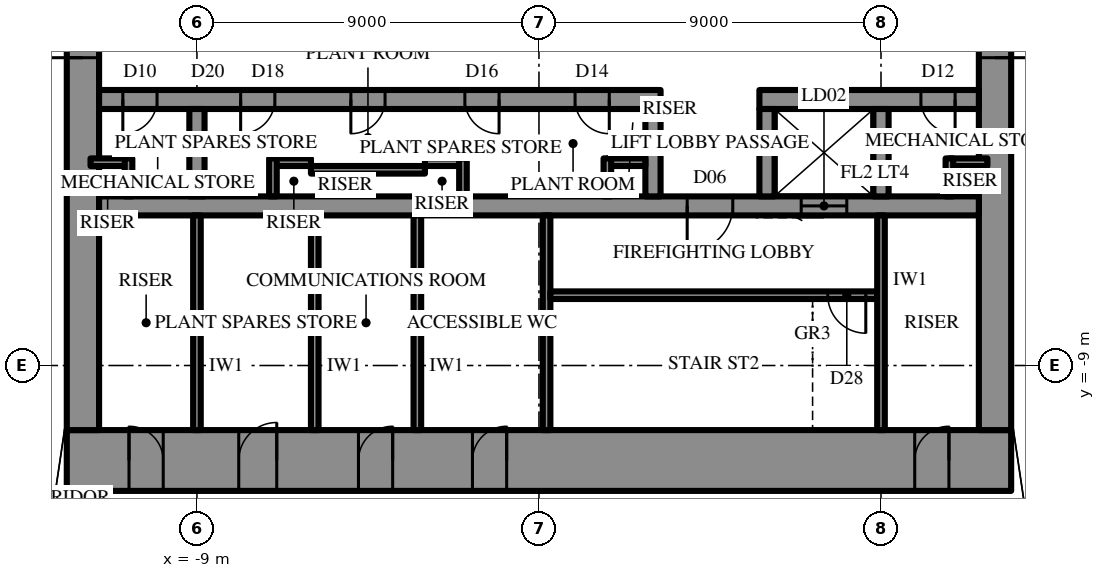
"""IFC4 building model, lengths in metres.
Left out: names, types, materials, properties, quantities, classifications, styles, units other than length and angle.
Written with IfcOpenShell. Run it as: python <this file> out.ifc"""

import sys

from ifc_helpers import new_model, si_unit, direction, frame, frame_2d, origin, place, context, subcontext, project, spatial, rectangle, extrude, element, fill, save


model = new_model("IFC4")
c1 = context("Model", 3, precision=1e-05, world=origin(), true_north=direction((0.0, 1.0)))
c2 = subcontext(c1, "Body", "Model", "MODEL_VIEW")
j1 = project(units=[si_unit("LENGTHUNIT", "METRE"), si_unit("PLANEANGLEUNIT", "RADIAN")], contexts=[c1])
p1 = place(None, origin())
s1 = spatial("IfcSite", under=j1, at=p1, CompositionType="ELEMENT")
p2 = place(p1, origin())
s2 = spatial("IfcBuilding", under=s1, at=p2, CompositionType="ELEMENT")
p3 = place(p2, frame((0.0, 0.0, 402.3)))
s3 = spatial("IfcBuildingStorey", under=s2, at=p3, CompositionType="ELEMENT", Elevation=402.3)
p4 = place(p3, frame((12.425, -11.5, 0.0), z_axis=(0.0, 0.0, 1.0), x_axis=(-1.0, 0.0, 0.0)))
e1 = element("IfcWall", 1, at=p4, inside=s3, PredefinedType="SHEAR", context=c2, shape_type="SweptSolid", body=[
    extrude(rectangle(XDim=24.85, YDim=1.6, at=frame_2d((12.425, 0.0))), origin(), (0.0, 0.0, 1.0), 6.0),
])
p5 = place(p4, frame((13.275, 0.0, 0.0)))
e2 = element("IfcOpeningElement", 2, at=p5, cuts=e1, PredefinedType="OPENING", context=c2, shape_type="SweptSolid", body=[
    extrude(rectangle(XDim=0.9, YDim=2.2, at=frame_2d((0.45, 1.1))), frame((0.0, 0.81, 0.0), z_axis=(0.0, -1.0, 0.0), x_axis=(1.0, 0.0, 0.0)), (0.0, 0.0, 1.0), 1.62),
])
p6 = place(p4, frame((16.275, 0.0, 0.0)))
e3 = element("IfcOpeningElement", 3, at=p6, cuts=e1, PredefinedType="OPENING", context=c2, shape_type="SweptSolid", body=[
    extrude(rectangle(XDim=0.9, YDim=2.2, at=frame_2d((0.45, 1.1))), frame((0.0, 0.81, 0.0), z_axis=(0.0, -1.0, 0.0), x_axis=(1.0, 0.0, 0.0)), (0.0, 0.0, 1.0), 1.62),
])
p7 = place(p4, frame((19.325, 0.0, 0.0)))
e4 = element("IfcOpeningElement", 4, at=p7, cuts=e1, PredefinedType="OPENING", context=c2, shape_type="SweptSolid", body=[
    extrude(rectangle(XDim=1.0, YDim=2.2, at=frame_2d((0.5, 1.1))), frame((0.0, 0.81, 0.0), z_axis=(0.0, -1.0, 0.0), x_axis=(1.0, 0.0, 0.0)), (0.0, 0.0, 1.0), 1.62),
])
p8 = place(p4, frame((1.637, 0.0, 0.0)))
e5 = element("IfcOpeningElement", 5, at=p8, cuts=e1, PredefinedType="OPENING", context=c2, shape_type="SweptSolid", body=[
    extrude(rectangle(XDim=0.9, YDim=2.2, at=frame_2d((0.45, 1.1))), frame((0.0, 0.81, 0.0), z_axis=(0.0, -1.0, 0.0), x_axis=(1.0, 0.0, 0.0)), (0.0, 0.0, 1.0), 1.62),
])
p9 = place(p4, frame((22.312, 0.0, 0.0)))
e6 = element("IfcOpeningElement", 6, at=p9, cuts=e1, PredefinedType="OPENING", context=c2, shape_type="SweptSolid", body=[
    extrude(rectangle(XDim=0.9, YDim=2.2, at=frame_2d((0.45, 1.1))), frame((0.0, 0.81, 0.0), z_axis=(0.0, -1.0, 0.0), x_axis=(1.0, 0.0, 0.0)), (0.0, 0.0, 1.0), 1.62),
])
p10 = place(p3, frame((12.0, -10.7, 0.0), z_axis=(0.0, 0.0, 1.0), x_axis=(0.0, 1.0, 0.0)))
e7 = element("IfcWall", 7, at=p10, inside=s3, PredefinedType="SHEAR", context=c2, shape_type="SweptSolid", body=[
    extrude(rectangle(XDim=21.4, YDim=0.85, at=frame_2d((10.7, 0.0))), origin(), (0.0, 0.0, 1.0), 6.0),
])
p11 = place(p10, frame((9.8, 0.0, 0.0)))
e8 = element("IfcOpeningElement", 8, at=p11, cuts=e7, PredefinedType="OPENING", context=c2, shape_type="SweptSolid", body=[
    extrude(rectangle(XDim=1.8, YDim=2.4, at=frame_2d((0.9, 1.2))), frame((0.0, 0.435, 0.0), z_axis=(0.0, -1.0, 0.0), x_axis=(1.0, 0.0, 0.0)), (0.0, 0.0, 1.0), 0.87),
])
p12 = place(p3, frame((-12.0, 10.7, 0.0), z_axis=(0.0, 0.0, 1.0), x_axis=(0.0, -1.0, 0.0)))
e9 = element("IfcWall", 9, at=p12, inside=s3, PredefinedType="SHEAR", context=c2, shape_type="SweptSolid", body=[
    extrude(rectangle(XDim=21.4, YDim=0.85, at=frame_2d((10.7, 0.0))), origin(), (0.0, 0.0, 1.0), 6.0),
])
p13 = place(p12, frame((9.8, 0.0, 0.0)))
e10 = element("IfcOpeningElement", 10, at=p13, cuts=e9, PredefinedType="OPENING", context=c2, shape_type="SweptSolid", body=[
    extrude(rectangle(XDim=1.8, YDim=2.4, at=frame_2d((0.9, 1.2))), frame((0.0, 0.435, 0.0), z_axis=(0.0, -1.0, 0.0), x_axis=(1.0, 0.0, 0.0)), (0.0, 0.0, 1.0), 0.87),
])
p14 = place(p3, frame((11.575, -2.0, 0.0), z_axis=(0.0, 0.0, 1.0), x_axis=(-1.0, 0.0, 0.0)))
e11 = element("IfcWall", 11, at=p14, inside=s3, PredefinedType="SHEAR", context=c2, shape_type="SweptSolid", body=[
    extrude(rectangle(XDim=5.775, YDim=0.5, at=frame_2d((2.887, 0.0))), origin(), (0.0, 0.0, 1.0), 6.0),
])
p15 = place(p14, frame((0.625, 0.0, 0.0)))
e12 = element("IfcOpeningElement", 12, at=p15, cuts=e11, PredefinedType="OPENING", context=c2, shape_type="SweptSolid", body=[
    extrude(rectangle(XDim=0.9, YDim=2.2, at=frame_2d((0.45, 1.1))), frame((0.0, 0.26, 0.0), z_axis=(0.0, -1.0, 0.0), x_axis=(1.0, 0.0, 0.0)), (0.0, 0.0, 1.0), 0.52),
])
p16 = place(p3, frame((3.2, -2.0, 0.0), z_axis=(0.0, 0.0, 1.0), x_axis=(-1.0, 0.0, 0.0)))
e13 = element("IfcWall", 13, at=p16, inside=s3, PredefinedType="SHEAR", context=c2, shape_type="SweptSolid", body=[
    extrude(rectangle(XDim=14.775, YDim=0.5, at=frame_2d((7.387, 0.0))), origin(), (0.0, 0.0, 1.0), 6.0),
])
p17 = place(p16, frame((1.35, 0.0, 0.0)))
e14 = element("IfcOpeningElement", 14, at=p17, cuts=e13, PredefinedType="OPENING", context=c2, shape_type="SweptSolid", body=[
    extrude(rectangle(XDim=0.9, YDim=2.2, at=frame_2d((0.45, 1.1))), frame((0.0, 0.26, 0.0), z_axis=(0.0, -1.0, 0.0), x_axis=(1.0, 0.0, 0.0)), (0.0, 0.0, 1.0), 0.52),
])
p18 = place(p16, frame((4.25, 0.0, 0.0)))
e15 = element("IfcOpeningElement", 15, at=p18, cuts=e13, PredefinedType="OPENING", context=c2, shape_type="SweptSolid", body=[
    extrude(rectangle(XDim=0.9, YDim=2.2, at=frame_2d((0.45, 1.1))), frame((0.0, 0.26, 0.0), z_axis=(0.0, -1.0, 0.0), x_axis=(1.0, 0.0, 0.0)), (0.0, 0.0, 1.0), 0.52),
])
p19 = place(p16, frame((7.25, 0.0, 0.0)))
e16 = element("IfcOpeningElement", 16, at=p19, cuts=e13, PredefinedType="OPENING", context=c2, shape_type="SweptSolid", body=[
    extrude(rectangle(XDim=0.9, YDim=2.2, at=frame_2d((0.45, 1.1))), frame((0.0, 0.26, 0.0), z_axis=(0.0, -1.0, 0.0), x_axis=(1.0, 0.0, 0.0)), (0.0, 0.0, 1.0), 0.52),
])
p20 = place(p16, frame((10.15, 0.0, 0.0)))
e17 = element("IfcOpeningElement", 17, at=p20, cuts=e13, PredefinedType="OPENING", context=c2, shape_type="SweptSolid", body=[
    extrude(rectangle(XDim=0.9, YDim=2.2, at=frame_2d((0.45, 1.1))), frame((0.0, 0.26, 0.0), z_axis=(0.0, -1.0, 0.0), x_axis=(1.0, 0.0, 0.0)), (0.0, 0.0, 1.0), 0.52),
])
p21 = place(p16, frame((13.25, 0.0, 0.0)))
e18 = element("IfcOpeningElement", 18, at=p21, cuts=e13, PredefinedType="OPENING", context=c2, shape_type="SweptSolid", body=[
    extrude(rectangle(XDim=0.9, YDim=2.2, at=frame_2d((0.45, 1.1))), frame((0.0, 0.26, 0.0), z_axis=(0.0, -1.0, 0.0), x_axis=(1.0, 0.0, 0.0)), (0.0, 0.0, 1.0), 0.52),
])
p22 = place(p3, frame((11.575, -4.8, 0.0), z_axis=(0.0, 0.0, 1.0), x_axis=(-1.0, 0.0, 0.0)))
e19 = element("IfcWall", 19, at=p22, inside=s3, PredefinedType="SHEAR", context=c2, shape_type="SweptSolid", body=[
    extrude(rectangle(XDim=23.15, YDim=0.5, at=frame_2d((11.575, 0.0))), origin(), (0.0, 0.0, 1.0), 6.0),
])
p23 = place(p22, frame((6.475, 0.0, 0.0)))
e20 = element("IfcOpeningElement", 20, at=p23, cuts=e19, PredefinedType="OPENING", context=c2, shape_type="SweptSolid", body=[
    extrude(rectangle(XDim=1.2, YDim=2.2, at=frame_2d((0.6, 1.1))), frame((0.0, 0.26, 0.0), z_axis=(0.0, -1.0, 0.0), x_axis=(1.0, 0.0, 0.0)), (0.0, 0.0, 1.0), 0.52),
])
p24 = place(p22, frame((3.475, 0.0, 0.0)))
e21 = element("IfcOpeningElement", 21, at=p24, cuts=e19, PredefinedType="OPENING", context=c2, shape_type="SweptSolid", body=[
    extrude(rectangle(XDim=1.2, YDim=2.2, at=frame_2d((0.6, 1.1))), frame((0.0, 0.26, 0.0), z_axis=(0.0, -1.0, 0.0), x_axis=(1.0, 0.0, 0.0)), (0.0, 0.0, 1.0), 0.52),
])
for number, where, z_axis, x_axis in (
    (22, (9.0, -2.25, 0.0), (0.0, 0.0, 1.0), (0.0, -1.0, 0.0)),
    (23, (6.0, -2.25, 0.0), (0.0, 0.0, 1.0), (0.0, -1.0, 0.0)),
    (24, (3.0, -2.25, 0.0), (0.0, 0.0, 1.0), (0.0, -1.0, 0.0)),
    (25, (-9.0, -2.25, 0.0), (0.0, 0.0, 1.0), (0.0, -1.0, 0.0)),
):
    element("IfcWall", number, at=place(p3, frame(where, z_axis=z_axis, x_axis=x_axis)), inside=s3, PredefinedType="SHEAR", context=c2, shape_type="SweptSolid", body=[
        extrude(rectangle(XDim=2.3, YDim=0.4, at=frame_2d((1.15, 0.0))), origin(), (0.0, 0.0, 1.0), 6.0),
    ])
p25 = place(p3, frame((0.2, -5.05, 0.0), z_axis=(0.0, 0.0, 1.0), x_axis=(0.0, -1.0, 0.0)))
e26 = element("IfcWall", 26, at=p25, inside=s3, PredefinedType="SHEAR", context=c2, shape_type="SweptSolid", body=[
    extrude(rectangle(XDim=5.65, YDim=0.2, at=frame_2d((2.825, 0.0))), origin(), (0.0, 0.0, 1.0), 6.0),
])
p26 = place(p3, frame((8.9, -7.15, 0.0), z_axis=(0.0, 0.0, 1.0), x_axis=(-1.0, 0.0, 0.0)))
e27 = element("IfcWall", 27, at=p26, inside=s3, PredefinedType="SHEAR", context=c2, shape_type="SweptSolid", body=[
    extrude(rectangle(XDim=8.6, YDim=0.2, at=frame_2d((4.3, 0.0))), origin(), (0.0, 0.0, 1.0), 6.0),
])
p27 = place(p26, frame((0.3, 0.0, 0.0)))
e28 = element("IfcOpeningElement", 28, at=p27, cuts=e27, PredefinedType="OPENING", context=c2, shape_type="SweptSolid", body=[
    extrude(rectangle(XDim=1.0, YDim=2.2, at=frame_2d((0.5, 1.1))), frame((0.0, 0.11, 0.0), z_axis=(0.0, -1.0, 0.0), x_axis=(1.0, 0.0, 0.0)), (0.0, 0.0, 1.0), 0.22),
])
for number, where, z_axis, x_axis in (
    (29, (9.0, -5.05, 0.0), (0.0, 0.0, 1.0), (0.0, -1.0, 0.0)),
    (30, (-9.0, -5.05, 0.0), (0.0, 0.0, 1.0), (0.0, -1.0, 0.0)),
    (31, (-3.2, -5.05, 0.0), (0.0, 0.0, 1.0), (0.0, -1.0, 0.0)),
    (32, (-5.9, -5.05, 0.0), (0.0, 0.0, 1.0), (0.0, -1.0, 0.0)),
):
    element("IfcWall", number, at=place(p3, frame(where, z_axis=z_axis, x_axis=x_axis)), inside=s3, PredefinedType="PARTITIONING", context=c2, shape_type="SweptSolid", body=[
        extrude(rectangle(XDim=5.65, YDim=0.2, at=frame_2d((2.825, 0.0))), origin(), (0.0, 0.0, 1.0), 5.7),
    ])
for number, where, z_axis, x_axis in (
    (33, (11.8, -3.65, 0.0), (0.0, 0.0, 1.0), (-1.0, 0.0, 0.0)),
    (34, (10.8, -3.55, 0.0), (0.0, 0.0, 1.0), (0.0, -1.0, 0.0)),
    (35, (2.8, -3.65, 0.0), (0.0, 0.0, 1.0), (-1.0, 0.0, 0.0)),
    (36, (1.8, -3.55, 0.0), (0.0, 0.0, 1.0), (0.0, -1.0, 0.0)),
    (37, (-2.0, -3.65, 0.0), (0.0, 0.0, 1.0), (-1.0, 0.0, 0.0)),
    (38, (-2.0, -3.55, 0.0), (0.0, 0.0, 1.0), (0.0, -1.0, 0.0)),
):
    element("IfcWall", number, at=place(p3, frame(where, z_axis=z_axis, x_axis=x_axis)), inside=s3, PredefinedType="PARTITIONING", context=c2, shape_type="SweptSolid", body=[
        extrude(rectangle(XDim=1.0, YDim=0.2, at=frame_2d((0.5, 0.0))), origin(), (0.0, 0.0, 1.0), 5.7),
    ])
p28 = place(p3, frame((-3.0, -3.85, 0.0), z_axis=(0.0, 0.0, 1.0), x_axis=(-1.0, 0.0, 0.0)))
e39 = element("IfcWall", 39, at=p28, inside=s3, PredefinedType="PARTITIONING", context=c2, shape_type="SweptSolid", body=[
    extrude(rectangle(XDim=3.0, YDim=0.2, at=frame_2d((1.5, 0.0))), origin(), (0.0, 0.0, 1.0), 5.7),
])
for number, where, z_axis, x_axis in (
    (40, (-6.0, -3.65, 0.0), (0.0, 0.0, 1.0), (-1.0, 0.0, 0.0)),
    (41, (-7.0, -3.55, 0.0), (0.0, 0.0, 1.0), (0.0, -1.0, 0.0)),
    (42, (-10.8, -3.65, 0.0), (0.0, 0.0, 1.0), (-1.0, 0.0, 0.0)),
    (43, (-10.8, -3.55, 0.0), (0.0, 0.0, 1.0), (0.0, -1.0, 0.0)),
):
    element("IfcWall", number, at=place(p3, frame(where, z_axis=z_axis, x_axis=x_axis)), inside=s3, PredefinedType="PARTITIONING", context=c2, shape_type="SweptSolid", body=[
        extrude(rectangle(XDim=1.0, YDim=0.2, at=frame_2d((0.5, 0.0))), origin(), (0.0, 0.0, 1.0), 5.7),
    ])
p29 = place(p11, frame((1.8, 0.0, 0.0), z_axis=(0.0, 0.0, 1.0), x_axis=(-1.0, 0.0, 0.0)))
e44 = element("IfcDoor", 44, at=p29, inside=s3, OperationType="DOUBLE_DOOR_SINGLE_SWING", PredefinedType="DOOR", context=c2, shape_type="SweptSolid", body=[
    extrude(rectangle(XDim=1.8, YDim=2.4, at=frame_2d((0.9, 1.2))), frame((0.0, 0.025, 0.0), z_axis=(0.0, -1.0, 0.0), x_axis=(1.0, 0.0, 0.0)), (0.0, 0.0, 1.0), 0.05),
])
fill(e8, e44)
p30 = place(p13, frame((1.8, 0.0, 0.0), z_axis=(0.0, 0.0, 1.0), x_axis=(-1.0, 0.0, 0.0)))
e45 = element("IfcDoor", 45, at=p30, inside=s3, OperationType="DOUBLE_DOOR_SINGLE_SWING", PredefinedType="DOOR", context=c2, shape_type="SweptSolid", body=[
    extrude(rectangle(XDim=1.8, YDim=2.4, at=frame_2d((0.9, 1.2))), frame((0.0, 0.025, 0.0), z_axis=(0.0, -1.0, 0.0), x_axis=(1.0, 0.0, 0.0)), (0.0, 0.0, 1.0), 0.05),
])
fill(e10, e45)
p31 = place(p23, origin())
e46 = element("IfcDoor", 46, at=p31, inside=s3, OperationType="SINGLE_SWING_LEFT", PredefinedType="DOOR", context=c2, shape_type="SweptSolid", body=[
    extrude(rectangle(XDim=1.2, YDim=2.2, at=frame_2d((0.6, 1.1))), frame((0.0, 0.025, 0.0), z_axis=(0.0, -1.0, 0.0), x_axis=(1.0, 0.0, 0.0)), (0.0, 0.0, 1.0), 0.05),
])
fill(e20, e46)
p32 = place(p27, origin())
e47 = element("IfcDoor", 47, at=p32, inside=s3, OperationType="SINGLE_SWING_RIGHT", PredefinedType="DOOR", context=c2, shape_type="SweptSolid", body=[
    extrude(rectangle(XDim=1.0, YDim=2.2, at=frame_2d((0.5, 1.1))), frame((0.0, 0.025, 0.0), z_axis=(0.0, -1.0, 0.0), x_axis=(1.0, 0.0, 0.0)), (0.0, 0.0, 1.0), 0.05),
])
fill(e28, e47)
p33 = place(p5, frame((0.9, 0.0, 0.0), z_axis=(0.0, 0.0, 1.0), x_axis=(-1.0, 0.0, 0.0)))
e48 = element("IfcDoor", 48, at=p33, inside=s3, OperationType="SINGLE_SWING_LEFT", PredefinedType="DOOR", context=c2, shape_type="SweptSolid", body=[
    extrude(rectangle(XDim=0.9, YDim=2.2, at=frame_2d((0.45, 1.1))), frame((0.0, 0.025, 0.0), z_axis=(0.0, -1.0, 0.0), x_axis=(1.0, 0.0, 0.0)), (0.0, 0.0, 1.0), 0.05),
])
fill(e2, e48)
p34 = place(p6, frame((0.9, 0.0, 0.0), z_axis=(0.0, 0.0, 1.0), x_axis=(-1.0, 0.0, 0.0)))
e49 = element("IfcDoor", 49, at=p34, inside=s3, OperationType="SINGLE_SWING_LEFT", PredefinedType="DOOR", context=c2, shape_type="SweptSolid", body=[
    extrude(rectangle(XDim=0.9, YDim=2.2, at=frame_2d((0.45, 1.1))), frame((0.0, 0.025, 0.0), z_axis=(0.0, -1.0, 0.0), x_axis=(1.0, 0.0, 0.0)), (0.0, 0.0, 1.0), 0.05),
])
fill(e3, e49)
p35 = place(p7, frame((1.0, 0.0, 0.0), z_axis=(0.0, 0.0, 1.0), x_axis=(-1.0, 0.0, 0.0)))
e50 = element("IfcDoor", 50, at=p35, inside=s3, OperationType="SINGLE_SWING_LEFT", PredefinedType="DOOR", context=c2, shape_type="SweptSolid", body=[
    extrude(rectangle(XDim=1.0, YDim=2.2, at=frame_2d((0.5, 1.1))), frame((0.0, 0.025, 0.0), z_axis=(0.0, -1.0, 0.0), x_axis=(1.0, 0.0, 0.0)), (0.0, 0.0, 1.0), 0.05),
])
fill(e4, e50)
p36 = place(p8, frame((0.9, 0.0, 0.0), z_axis=(0.0, 0.0, 1.0), x_axis=(-1.0, 0.0, 0.0)))
e51 = element("IfcDoor", 51, at=p36, inside=s3, OperationType="SINGLE_SWING_LEFT", PredefinedType="DOOR", context=c2, shape_type="SweptSolid", body=[
    extrude(rectangle(XDim=0.9, YDim=2.2, at=frame_2d((0.45, 1.1))), frame((0.0, 0.025, 0.0), z_axis=(0.0, -1.0, 0.0), x_axis=(1.0, 0.0, 0.0)), (0.0, 0.0, 1.0), 0.05),
])
fill(e5, e51)
p37 = place(p9, frame((0.9, 0.0, 0.0), z_axis=(0.0, 0.0, 1.0), x_axis=(-1.0, 0.0, 0.0)))
e52 = element("IfcDoor", 52, at=p37, inside=s3, OperationType="SINGLE_SWING_RIGHT", PredefinedType="DOOR", context=c2, shape_type="SweptSolid", body=[
    extrude(rectangle(XDim=0.9, YDim=2.2, at=frame_2d((0.45, 1.1))), frame((0.0, 0.025, 0.0), z_axis=(0.0, -1.0, 0.0), x_axis=(1.0, 0.0, 0.0)), (0.0, 0.0, 1.0), 0.05),
])
fill(e6, e52)
p38 = place(p15, origin())
e53 = element("IfcDoor", 53, at=p38, inside=s3, OperationType="SINGLE_SWING_RIGHT", PredefinedType="DOOR", context=c2, shape_type="SweptSolid", body=[
    extrude(rectangle(XDim=0.9, YDim=2.2, at=frame_2d((0.45, 1.1))), frame((0.0, 0.025, 0.0), z_axis=(0.0, -1.0, 0.0), x_axis=(1.0, 0.0, 0.0)), (0.0, 0.0, 1.0), 0.05),
])
fill(e12, e53)
p39 = place(p17, origin())
e54 = element("IfcDoor", 54, at=p39, inside=s3, OperationType="SINGLE_SWING_RIGHT", PredefinedType="DOOR", context=c2, shape_type="SweptSolid", body=[
    extrude(rectangle(XDim=0.9, YDim=2.2, at=frame_2d((0.45, 1.1))), frame((0.0, 0.025, 0.0), z_axis=(0.0, -1.0, 0.0), x_axis=(1.0, 0.0, 0.0)), (0.0, 0.0, 1.0), 0.05),
])
fill(e14, e54)
p40 = place(p18, origin())
e55 = element("IfcDoor", 55, at=p40, inside=s3, OperationType="SINGLE_SWING_RIGHT", PredefinedType="DOOR", context=c2, shape_type="SweptSolid", body=[
    extrude(rectangle(XDim=0.9, YDim=2.2, at=frame_2d((0.45, 1.1))), frame((0.0, 0.025, 0.0), z_axis=(0.0, -1.0, 0.0), x_axis=(1.0, 0.0, 0.0)), (0.0, 0.0, 1.0), 0.05),
])
fill(e15, e55)
p41 = place(p19, origin())
e56 = element("IfcDoor", 56, at=p41, inside=s3, OperationType="SINGLE_SWING_LEFT", PredefinedType="DOOR", context=c2, shape_type="SweptSolid", body=[
    extrude(rectangle(XDim=0.9, YDim=2.2, at=frame_2d((0.45, 1.1))), frame((0.0, 0.025, 0.0), z_axis=(0.0, -1.0, 0.0), x_axis=(1.0, 0.0, 0.0)), (0.0, 0.0, 1.0), 0.05),
])
fill(e16, e56)
p42 = place(p20, origin())
e57 = element("IfcDoor", 57, at=p42, inside=s3, OperationType="SINGLE_SWING_LEFT", PredefinedType="DOOR", context=c2, shape_type="SweptSolid", body=[
    extrude(rectangle(XDim=0.9, YDim=2.2, at=frame_2d((0.45, 1.1))), frame((0.0, 0.025, 0.0), z_axis=(0.0, -1.0, 0.0), x_axis=(1.0, 0.0, 0.0)), (0.0, 0.0, 1.0), 0.05),
])
fill(e17, e57)
p43 = place(p21, origin())
e58 = element("IfcDoor", 58, at=p43, inside=s3, OperationType="SINGLE_SWING_LEFT", PredefinedType="DOOR", context=c2, shape_type="SweptSolid", body=[
    extrude(rectangle(XDim=0.9, YDim=2.2, at=frame_2d((0.45, 1.1))), frame((0.0, 0.025, 0.0), z_axis=(0.0, -1.0, 0.0), x_axis=(1.0, 0.0, 0.0)), (0.0, 0.0, 1.0), 0.05),
])
fill(e18, e58)
p44 = place(p24, origin())
e59 = element("IfcDoor", 59, at=p44, inside=s3, OperationType="SLIDING_TO_LEFT", PredefinedType="DOOR", context=c2, shape_type="SweptSolid", body=[
    extrude(rectangle(XDim=1.2, YDim=2.2, at=frame_2d((0.6, 1.1))), frame((0.0, 0.025, 0.0), z_axis=(0.0, -1.0, 0.0), x_axis=(1.0, 0.0, 0.0)), (0.0, 0.0, 1.0), 0.05),
])
fill(e21, e59)
save(model, sys.argv[1])
